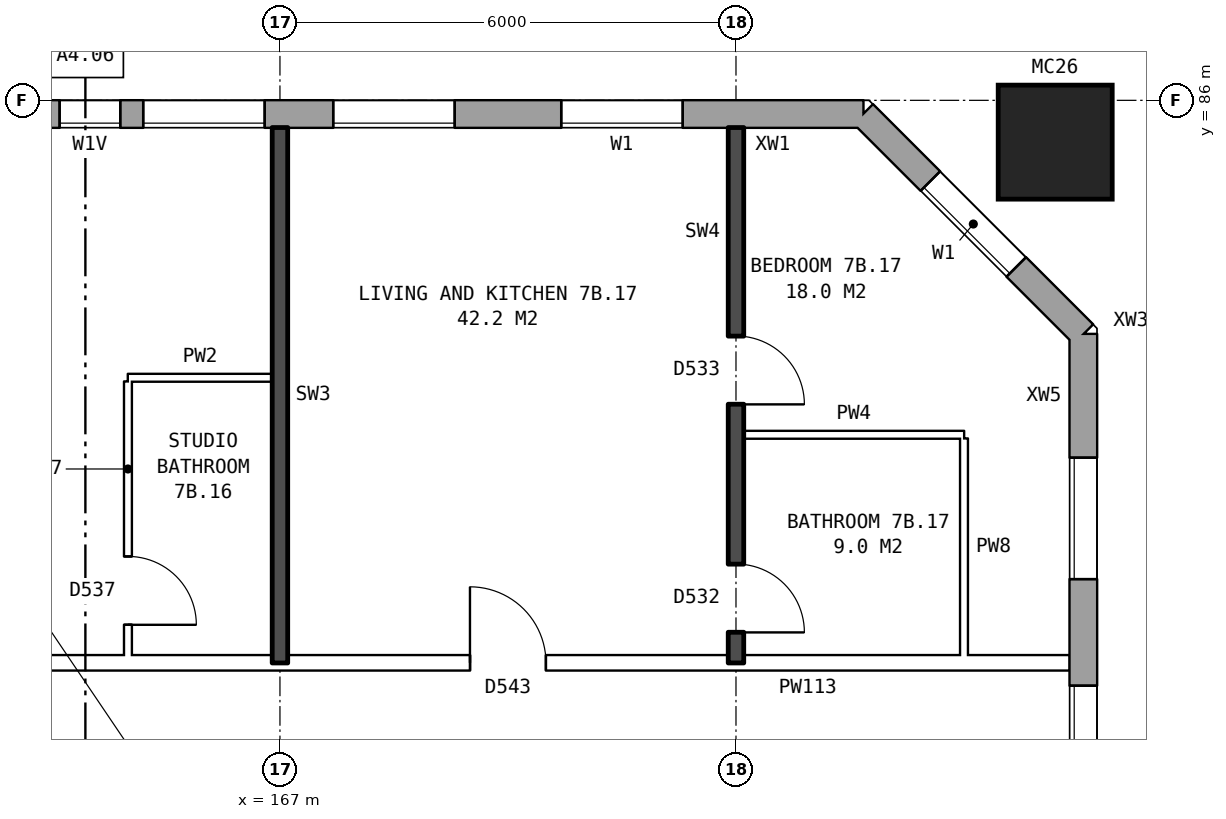
"""IFC4 building model, lengths in metres.
Left out: names, types, materials, properties, quantities, classifications, styles, units other than length and angle.
Written with IfcOpenShell. Run it as: python <this file> out.ifc"""

import sys

from ifc_helpers import new_model, si_unit, direction, frame, frame_2d, origin, origin_2d, place, context, subcontext, project, spatial, rectangle, hollow_rectangle, extrude, element, fill, save


model = new_model("IFC4")
c1 = context("Model", 3, precision=1e-05, world=origin(), true_north=direction((0.0, 1.0)))
c2 = subcontext(c1, "Body", "Model", "MODEL_VIEW")
j1 = project(units=[si_unit("LENGTHUNIT", "METRE"), si_unit("PLANEANGLEUNIT", "RADIAN")], contexts=[c1])
p1 = place(None, origin())
s1 = spatial("IfcSite", under=j1, at=p1, CompositionType="ELEMENT")
p2 = place(p1, origin())
s2 = spatial("IfcBuilding", under=s1, at=p2, CompositionType="ELEMENT")
p3 = place(p2, frame((0.0, 0.0, 28.8)))
s3 = spatial("IfcBuildingStorey", under=s2, at=p3, CompositionType="ELEMENT", Elevation=28.8)
p4 = place(p3, frame((177.2, 85.45, 0.0), z_axis=(0.0, 0.0, 1.0), x_axis=(1.0, 0.0, 0.0)))
e1 = element("IfcColumn", 1, at=p4, inside=s3, PredefinedType="COLUMN", context=c2, shape_type="SweptSolid", body=[
    extrude(hollow_rectangle(XDim=1.5, YDim=1.5, WallThickness=0.08, at=origin_2d()), origin(), (0.0, 0.0, 1.0), 3.1),
])
p5 = place(p3, frame((177.57, 57.075, 0.0), z_axis=(0.0, 0.0, 1.0), x_axis=(0.0, 1.0, 0.0)))
e2 = element("IfcWall", 2, at=p5, inside=s3, PredefinedType="STANDARD", context=c2, shape_type="SweptSolid", body=[
    extrude(rectangle(XDim=25.851, YDim=0.36, at=frame_2d((12.925, 0.0))), origin(), (0.0, 0.0, 1.0), 2.85),
])
p6 = place(p5, frame((1.625, 0.0, 0.8)))
e3 = element("IfcOpeningElement", 3, at=p6, cuts=e2, PredefinedType="OPENING", context=c2, shape_type="SweptSolid", body=[
    extrude(rectangle(XDim=1.6, YDim=1.8, at=frame_2d((0.8, 0.9))), frame((0.0, 0.19, 0.0), z_axis=(0.0, -1.0, 0.0), x_axis=(1.0, 0.0, 0.0)), (0.0, 0.0, 1.0), 0.38),
])
p7 = place(p5, frame((4.625, 0.0, 0.8)))
e4 = element("IfcOpeningElement", 4, at=p7, cuts=e2, PredefinedType="OPENING", context=c2, shape_type="SweptSolid", body=[
    extrude(rectangle(XDim=1.6, YDim=1.8, at=frame_2d((0.8, 0.9))), frame((0.0, 0.19, 0.0), z_axis=(0.0, -1.0, 0.0), x_axis=(1.0, 0.0, 0.0)), (0.0, 0.0, 1.0), 0.38),
])
p8 = place(p5, frame((6.525, 0.0, 0.8)))
e5 = element("IfcOpeningElement", 5, at=p8, cuts=e2, PredefinedType="OPENING", context=c2, shape_type="SweptSolid", body=[
    extrude(rectangle(XDim=1.0, YDim=1.8, at=frame_2d((0.5, 0.9))), frame((0.0, 0.19, 0.0), z_axis=(0.0, -1.0, 0.0), x_axis=(1.0, 0.0, 0.0)), (0.0, 0.0, 1.0), 0.38),
])
p9 = place(p5, frame((7.825, 0.0, 0.8)))
e6 = element("IfcOpeningElement", 6, at=p9, cuts=e2, PredefinedType="OPENING", context=c2, shape_type="SweptSolid", body=[
    extrude(rectangle(XDim=1.2, YDim=0.9, at=frame_2d((0.6, 0.45))), frame((0.0, 0.19, 0.0), z_axis=(0.0, -1.0, 0.0), x_axis=(1.0, 0.0, 0.0)), (0.0, 0.0, 1.0), 0.38),
])
p10 = place(p5, frame((10.325, 0.0, 1.7)))
e7 = element("IfcOpeningElement", 7, at=p10, cuts=e2, PredefinedType="OPENING", context=c2, shape_type="SweptSolid", body=[
    extrude(rectangle(XDim=1.2, YDim=0.9, at=frame_2d((0.6, 0.45))), frame((0.0, 0.19, 0.0), z_axis=(0.0, -1.0, 0.0), x_axis=(1.0, 0.0, 0.0)), (0.0, 0.0, 1.0), 0.38),
])
p11 = place(p5, frame((11.825, 0.0, 0.8)))
e8 = element("IfcOpeningElement", 8, at=p11, cuts=e2, PredefinedType="OPENING", context=c2, shape_type="SweptSolid", body=[
    extrude(rectangle(XDim=1.6, YDim=1.8, at=frame_2d((0.8, 0.9))), frame((0.0, 0.19, 0.0), z_axis=(0.0, -1.0, 0.0), x_axis=(1.0, 0.0, 0.0)), (0.0, 0.0, 1.0), 0.38),
])
p12 = place(p5, frame((19.625, 0.0, 0.8)))
e9 = element("IfcOpeningElement", 9, at=p12, cuts=e2, PredefinedType="OPENING", context=c2, shape_type="SweptSolid", body=[
    extrude(rectangle(XDim=1.6, YDim=1.8, at=frame_2d((0.8, 0.9))), frame((0.0, 0.19, 0.0), z_axis=(0.0, -1.0, 0.0), x_axis=(1.0, 0.0, 0.0)), (0.0, 0.0, 1.0), 0.38),
])
p13 = place(p5, frame((22.625, 0.0, 0.8)))
e10 = element("IfcOpeningElement", 10, at=p13, cuts=e2, PredefinedType="OPENING", context=c2, shape_type="SweptSolid", body=[
    extrude(rectangle(XDim=1.6, YDim=1.8, at=frame_2d((0.8, 0.9))), frame((0.0, 0.19, 0.0), z_axis=(0.0, -1.0, 0.0), x_axis=(1.0, 0.0, 0.0)), (0.0, 0.0, 1.0), 0.38),
])
p14 = place(p5, frame((13.725, 0.0, 1.1)))
e11 = element("IfcOpeningElement", 11, at=p14, cuts=e2, PredefinedType="OPENING", context=c2, shape_type="SweptSolid", body=[
    extrude(rectangle(XDim=0.8, YDim=1.5, at=frame_2d((0.4, 0.75))), frame((0.0, 0.19, 0.0), z_axis=(0.0, -1.0, 0.0), x_axis=(1.0, 0.0, 0.0)), (0.0, 0.0, 1.0), 0.38),
])
p15 = place(p5, frame((14.825, 0.0, 1.7)))
e12 = element("IfcOpeningElement", 12, at=p15, cuts=e2, PredefinedType="OPENING", context=c2, shape_type="SweptSolid", body=[
    extrude(rectangle(XDim=0.6, YDim=0.9, at=frame_2d((0.3, 0.45))), frame((0.0, 0.19, 0.0), z_axis=(0.0, -1.0, 0.0), x_axis=(1.0, 0.0, 0.0)), (0.0, 0.0, 1.0), 0.38),
])
p16 = place(p5, frame((16.775, 0.0, 0.8)))
e13 = element("IfcOpeningElement", 13, at=p16, cuts=e2, PredefinedType="OPENING", context=c2, shape_type="SweptSolid", body=[
    extrude(rectangle(XDim=1.2, YDim=0.9, at=frame_2d((0.6, 0.45))), frame((0.0, 0.19, 0.0), z_axis=(0.0, -1.0, 0.0), x_axis=(1.0, 0.0, 0.0)), (0.0, 0.0, 1.0), 0.38),
])
p17 = place(p5, frame((18.275, 0.0, 0.8)))
e14 = element("IfcOpeningElement", 14, at=p17, cuts=e2, PredefinedType="OPENING", context=c2, shape_type="SweptSolid", body=[
    extrude(rectangle(XDim=1.0, YDim=1.8, at=frame_2d((0.5, 0.9))), frame((0.0, 0.19, 0.0), z_axis=(0.0, -1.0, 0.0), x_axis=(1.0, 0.0, 0.0)), (0.0, 0.0, 1.0), 0.38),
])
p18 = place(p3, frame((177.57, 82.925, 0.0), z_axis=(0.0, 0.0, 1.0), x_axis=(-0.707106781187, 0.707106781187, 0.0)))
e15 = element("IfcWall", 15, at=p18, inside=s3, PredefinedType="STANDARD", context=c2, shape_type="SweptSolid", body=[
    extrude(rectangle(XDim=4.094, YDim=0.36, at=frame_2d((2.047, 0.0))), origin(), (0.0, 0.0, 1.0), 2.85),
])
p19 = place(p18, frame((1.247, 0.0, 0.8)))
e16 = element("IfcOpeningElement", 16, at=p19, cuts=e15, PredefinedType="OPENING", context=c2, shape_type="SweptSolid", body=[
    extrude(rectangle(XDim=1.6, YDim=1.8, at=frame_2d((0.8, 0.9))), frame((0.0, 0.19, 0.0), z_axis=(0.0, -1.0, 0.0), x_axis=(1.0, 0.0, 0.0)), (0.0, 0.0, 1.0), 0.38),
])
p20 = place(p3, frame((174.675, 85.82, 0.0), z_axis=(0.0, 0.0, 1.0), x_axis=(-1.0, 0.0, 0.0)))
e17 = element("IfcWall", 17, at=p20, inside=s3, PredefinedType="STANDARD", context=c2, shape_type="SweptSolid", body=[
    extrude(rectangle(XDim=40.601, YDim=0.36, at=frame_2d((20.3, 0.0))), origin(), (0.0, 0.0, 1.0), 2.85),
])
p21 = place(p20, frame((2.375, 0.0, 0.8)))
e18 = element("IfcOpeningElement", 18, at=p21, cuts=e17, PredefinedType="OPENING", context=c2, shape_type="SweptSolid", body=[
    extrude(rectangle(XDim=1.6, YDim=1.8, at=frame_2d((0.8, 0.9))), frame((0.0, 0.19, 0.0), z_axis=(0.0, -1.0, 0.0), x_axis=(1.0, 0.0, 0.0)), (0.0, 0.0, 1.0), 0.38),
])
p22 = place(p20, frame((5.375, 0.0, 0.8)))
e19 = element("IfcOpeningElement", 19, at=p22, cuts=e17, PredefinedType="OPENING", context=c2, shape_type="SweptSolid", body=[
    extrude(rectangle(XDim=1.6, YDim=1.8, at=frame_2d((0.8, 0.9))), frame((0.0, 0.19, 0.0), z_axis=(0.0, -1.0, 0.0), x_axis=(1.0, 0.0, 0.0)), (0.0, 0.0, 1.0), 0.38),
])
p23 = place(p20, frame((7.875, 0.0, 0.8)))
e20 = element("IfcOpeningElement", 20, at=p23, cuts=e17, PredefinedType="OPENING", context=c2, shape_type="SweptSolid", body=[
    extrude(rectangle(XDim=1.6, YDim=1.8, at=frame_2d((0.8, 0.9))), frame((0.0, 0.19, 0.0), z_axis=(0.0, -1.0, 0.0), x_axis=(1.0, 0.0, 0.0)), (0.0, 0.0, 1.0), 0.38),
])
p24 = place(p20, frame((9.775, 0.0, 1.7)))
e21 = element("IfcOpeningElement", 21, at=p24, cuts=e17, PredefinedType="OPENING", context=c2, shape_type="SweptSolid", body=[
    extrude(rectangle(XDim=0.8, YDim=0.9, at=frame_2d((0.4, 0.45))), frame((0.0, 0.19, 0.0), z_axis=(0.0, -1.0, 0.0), x_axis=(1.0, 0.0, 0.0)), (0.0, 0.0, 1.0), 0.38),
])
p25 = place(p20, frame((14.375, 0.0, 0.8)))
e22 = element("IfcOpeningElement", 22, at=p25, cuts=e17, PredefinedType="OPENING", context=c2, shape_type="SweptSolid", body=[
    extrude(rectangle(XDim=1.6, YDim=1.8, at=frame_2d((0.8, 0.9))), frame((0.0, 0.19, 0.0), z_axis=(0.0, -1.0, 0.0), x_axis=(1.0, 0.0, 0.0)), (0.0, 0.0, 1.0), 0.38),
])
p26 = place(p20, frame((17.375, 0.0, 0.8)))
e23 = element("IfcOpeningElement", 23, at=p26, cuts=e17, PredefinedType="OPENING", context=c2, shape_type="SweptSolid", body=[
    extrude(rectangle(XDim=1.6, YDim=1.8, at=frame_2d((0.8, 0.9))), frame((0.0, 0.19, 0.0), z_axis=(0.0, -1.0, 0.0), x_axis=(1.0, 0.0, 0.0)), (0.0, 0.0, 1.0), 0.38),
])
p27 = place(p20, frame((20.375, 0.0, 0.8)))
e24 = element("IfcOpeningElement", 24, at=p27, cuts=e17, PredefinedType="OPENING", context=c2, shape_type="SweptSolid", body=[
    extrude(rectangle(XDim=1.6, YDim=1.8, at=frame_2d((0.8, 0.9))), frame((0.0, 0.19, 0.0), z_axis=(0.0, -1.0, 0.0), x_axis=(1.0, 0.0, 0.0)), (0.0, 0.0, 1.0), 0.38),
])
p28 = place(p20, frame((23.375, 0.0, 0.8)))
e25 = element("IfcOpeningElement", 25, at=p28, cuts=e17, PredefinedType="OPENING", context=c2, shape_type="SweptSolid", body=[
    extrude(rectangle(XDim=1.6, YDim=1.8, at=frame_2d((0.8, 0.9))), frame((0.0, 0.19, 0.0), z_axis=(0.0, -1.0, 0.0), x_axis=(1.0, 0.0, 0.0)), (0.0, 0.0, 1.0), 0.38),
])
p29 = place(p20, frame((25.875, 0.0, 0.8)))
e26 = element("IfcOpeningElement", 26, at=p29, cuts=e17, PredefinedType="OPENING", context=c2, shape_type="SweptSolid", body=[
    extrude(rectangle(XDim=1.6, YDim=1.8, at=frame_2d((0.8, 0.9))), frame((0.0, 0.19, 0.0), z_axis=(0.0, -1.0, 0.0), x_axis=(1.0, 0.0, 0.0)), (0.0, 0.0, 1.0), 0.38),
])
p30 = place(p20, frame((28.825, 0.0, 0.15)))
e27 = element("IfcOpeningElement", 27, at=p30, cuts=e17, PredefinedType="OPENING", context=c2, shape_type="SweptSolid", body=[
    extrude(rectangle(XDim=0.6, YDim=0.9, at=frame_2d((0.3, 0.45))), frame((0.0, 0.19, 0.0), z_axis=(0.0, -1.0, 0.0), x_axis=(1.0, 0.0, 0.0)), (0.0, 0.0, 1.0), 0.38),
])
p31 = place(p20, frame((32.375, 0.0, 0.8)))
e28 = element("IfcOpeningElement", 28, at=p31, cuts=e17, PredefinedType="OPENING", context=c2, shape_type="SweptSolid", body=[
    extrude(rectangle(XDim=1.6, YDim=1.8, at=frame_2d((0.8, 0.9))), frame((0.0, 0.19, 0.0), z_axis=(0.0, -1.0, 0.0), x_axis=(1.0, 0.0, 0.0)), (0.0, 0.0, 1.0), 0.38),
])
p32 = place(p20, frame((35.375, 0.0, 0.8)))
e29 = element("IfcOpeningElement", 29, at=p32, cuts=e17, PredefinedType="OPENING", context=c2, shape_type="SweptSolid", body=[
    extrude(rectangle(XDim=1.6, YDim=1.8, at=frame_2d((0.8, 0.9))), frame((0.0, 0.19, 0.0), z_axis=(0.0, -1.0, 0.0), x_axis=(1.0, 0.0, 0.0)), (0.0, 0.0, 1.0), 0.38),
])
p33 = place(p20, frame((38.375, 0.0, 0.8)))
e30 = element("IfcOpeningElement", 30, at=p33, cuts=e17, PredefinedType="OPENING", context=c2, shape_type="SweptSolid", body=[
    extrude(rectangle(XDim=1.6, YDim=1.8, at=frame_2d((0.8, 0.9))), frame((0.0, 0.19, 0.0), z_axis=(0.0, -1.0, 0.0), x_axis=(1.0, 0.0, 0.0)), (0.0, 0.0, 1.0), 0.38),
])
p34 = place(p20, frame((12.275, 0.0, 0.8)))
e31 = element("IfcOpeningElement", 31, at=p34, cuts=e17, PredefinedType="OPENING", context=c2, shape_type="SweptSolid", body=[
    extrude(rectangle(XDim=1.2, YDim=1.2, at=frame_2d((0.6, 0.6))), frame((0.0, 0.19, 0.0), z_axis=(0.0, -1.0, 0.0), x_axis=(1.0, 0.0, 0.0)), (0.0, 0.0, 1.0), 0.38),
])
p35 = place(p20, frame((27.775, 0.0, 0.8)))
e32 = element("IfcOpeningElement", 32, at=p35, cuts=e17, PredefinedType="OPENING", context=c2, shape_type="SweptSolid", body=[
    extrude(rectangle(XDim=0.6, YDim=0.9, at=frame_2d((0.3, 0.45))), frame((0.0, 0.19, 0.0), z_axis=(0.0, -1.0, 0.0), x_axis=(1.0, 0.0, 0.0)), (0.0, 0.0, 1.0), 0.38),
])
p36 = place(p20, frame((30.025, 0.0, 1.65)))
e33 = element("IfcOpeningElement", 33, at=p36, cuts=e17, PredefinedType="OPENING", context=c2, shape_type="SweptSolid", body=[
    extrude(rectangle(XDim=1.4, YDim=0.9, at=frame_2d((0.7, 0.45))), frame((0.0, 0.19, 0.0), z_axis=(0.0, -1.0, 0.0), x_axis=(1.0, 0.0, 0.0)), (0.0, 0.0, 1.0), 0.38),
])
p37 = place(p3, frame((155.1, 78.6, 0.0), z_axis=(0.0, 0.0, 1.0), x_axis=(1.0, 0.0, 0.0)))
e34 = element("IfcWall", 34, at=p37, inside=s3, PredefinedType="PARTITIONING", context=c2, shape_type="SweptSolid", body=[
    extrude(rectangle(XDim=22.29, YDim=0.2, at=frame_2d((11.145, 0.0))), origin(), (0.0, 0.0, 1.0), 2.85),
])
p38 = place(p37, frame((1.45, 0.0, 0.0)))
e35 = element("IfcOpeningElement", 35, at=p38, cuts=e34, PredefinedType="OPENING", context=c2, shape_type="SweptSolid", body=[
    extrude(rectangle(XDim=1.0, YDim=2.1, at=frame_2d((0.5, 1.05))), frame((0.0, 0.11, 0.0), z_axis=(0.0, -1.0, 0.0), x_axis=(1.0, 0.0, 0.0)), (0.0, 0.0, 1.0), 0.22),
])
p39 = place(p37, frame((7.4, 0.0, 0.0)))
e36 = element("IfcOpeningElement", 36, at=p39, cuts=e34, PredefinedType="OPENING", context=c2, shape_type="SweptSolid", body=[
    extrude(rectangle(XDim=1.0, YDim=2.1, at=frame_2d((0.5, 1.05))), frame((0.0, 0.11, 0.0), z_axis=(0.0, -1.0, 0.0), x_axis=(1.0, 0.0, 0.0)), (0.0, 0.0, 1.0), 0.22),
])
p40 = place(p37, frame((14.4, 0.0, 0.0)))
e37 = element("IfcOpeningElement", 37, at=p40, cuts=e34, PredefinedType="OPENING", context=c2, shape_type="SweptSolid", body=[
    extrude(rectangle(XDim=1.0, YDim=2.1, at=frame_2d((0.5, 1.05))), frame((0.0, 0.11, 0.0), z_axis=(0.0, -1.0, 0.0), x_axis=(1.0, 0.0, 0.0)), (0.0, 0.0, 1.0), 0.22),
])
p41 = place(p3, frame((173.1, 81.6, 0.0), z_axis=(0.0, 0.0, 1.0), x_axis=(1.0, 0.0, 0.0)))
e38 = element("IfcWall", 38, at=p41, inside=s3, PredefinedType="PARTITIONING", context=c2, shape_type="SweptSolid", body=[
    extrude(rectangle(XDim=2.9, YDim=0.1, at=frame_2d((1.45, 0.0))), origin(), (0.0, 0.0, 1.0), 2.85),
])
p42 = place(p3, frame((165.0, 82.35, 0.0), z_axis=(0.0, 0.0, 1.0), x_axis=(1.0, 0.0, 0.0)))
e39 = element("IfcWall", 39, at=p42, inside=s3, PredefinedType="PARTITIONING", context=c2, shape_type="SweptSolid", body=[
    extrude(rectangle(XDim=1.9, YDim=0.1, at=frame_2d((0.95, 0.0))), origin(), (0.0, 0.0, 1.0), 2.85),
])
p43 = place(p3, frame((165.0, 78.7, 0.0), z_axis=(0.0, 0.0, 1.0), x_axis=(0.0, 1.0, 0.0)))
e40 = element("IfcWall", 40, at=p43, inside=s3, PredefinedType="PARTITIONING", context=c2, shape_type="SweptSolid", body=[
    extrude(rectangle(XDim=3.6, YDim=0.1, at=frame_2d((1.8, 0.0))), origin(), (0.0, 0.0, 1.0), 2.85),
])
p44 = place(p43, frame((0.4, 0.0, 0.0)))
e41 = element("IfcOpeningElement", 41, at=p44, cuts=e40, PredefinedType="OPENING", context=c2, shape_type="SweptSolid", body=[
    extrude(rectangle(XDim=0.9, YDim=2.1, at=frame_2d((0.45, 1.05))), frame((0.0, 0.06, 0.0), z_axis=(0.0, -1.0, 0.0), x_axis=(1.0, 0.0, 0.0)), (0.0, 0.0, 1.0), 0.12),
])
p45 = place(p3, frame((167.0, 78.6, 0.0), z_axis=(0.0, 0.0, 1.0), x_axis=(0.0, 1.0, 0.0)))
e42 = element("IfcWall", 42, at=p45, inside=s3, PredefinedType="SOLIDWALL", context=c2, shape_type="SweptSolid", body=[
    extrude(rectangle(XDim=7.04, YDim=0.2, at=frame_2d((3.52, 0.0))), origin(), (0.0, 0.0, 1.0), 2.85),
])
p46 = place(p3, frame((173.0, 78.6, 0.0), z_axis=(0.0, 0.0, 1.0), x_axis=(0.0, 1.0, 0.0)))
e43 = element("IfcWall", 43, at=p46, inside=s3, PredefinedType="SOLIDWALL", context=c2, shape_type="SweptSolid", body=[
    extrude(rectangle(XDim=7.04, YDim=0.2, at=frame_2d((3.52, 0.0))), origin(), (0.0, 0.0, 1.0), 2.85),
])
p47 = place(p46, frame((3.4, 0.0, 0.0)))
e44 = element("IfcOpeningElement", 44, at=p47, cuts=e43, PredefinedType="OPENING", context=c2, shape_type="SweptSolid", body=[
    extrude(rectangle(XDim=0.9, YDim=2.1, at=frame_2d((0.45, 1.05))), frame((0.0, 0.11, 0.0), z_axis=(0.0, -1.0, 0.0), x_axis=(1.0, 0.0, 0.0)), (0.0, 0.0, 1.0), 0.22),
])
p48 = place(p46, frame((0.4, 0.0, 0.0)))
e45 = element("IfcOpeningElement", 45, at=p48, cuts=e43, PredefinedType="OPENING", context=c2, shape_type="SweptSolid", body=[
    extrude(rectangle(XDim=0.9, YDim=2.1, at=frame_2d((0.45, 1.05))), frame((0.0, 0.11, 0.0), z_axis=(0.0, -1.0, 0.0), x_axis=(1.0, 0.0, 0.0)), (0.0, 0.0, 1.0), 0.22),
])
p49 = place(p3, frame((176.0, 78.7, 0.0), z_axis=(0.0, 0.0, 1.0), x_axis=(0.0, 1.0, 0.0)))
e46 = element("IfcWall", 46, at=p49, inside=s3, PredefinedType="PARTITIONING", context=c2, shape_type="SweptSolid", body=[
    extrude(rectangle(XDim=2.85, YDim=0.1, at=frame_2d((1.425, 0.0))), origin(), (0.0, 0.0, 1.0), 2.85),
])
p50 = place(p12, origin())
e47 = element("IfcWindow", 47, at=p50, inside=s3, PartitioningType="SINGLE_PANEL", PredefinedType="WINDOW", context=c2, shape_type="SweptSolid", body=[
    extrude(rectangle(XDim=1.6, YDim=1.8, at=frame_2d((0.8, 0.9))), frame((0.0, 0.15, 0.0), z_axis=(0.0, -1.0, 0.0), x_axis=(1.0, 0.0, 0.0)), (0.0, 0.0, 1.0), 0.06),
])
fill(e9, e47)
p51 = place(p13, origin())
e48 = element("IfcWindow", 48, at=p51, inside=s3, PartitioningType="SINGLE_PANEL", PredefinedType="WINDOW", context=c2, shape_type="SweptSolid", body=[
    extrude(rectangle(XDim=1.6, YDim=1.8, at=frame_2d((0.8, 0.9))), frame((0.0, 0.15, 0.0), z_axis=(0.0, -1.0, 0.0), x_axis=(1.0, 0.0, 0.0)), (0.0, 0.0, 1.0), 0.06),
])
fill(e10, e48)
p52 = place(p19, origin())
e49 = element("IfcWindow", 49, at=p52, inside=s3, PartitioningType="SINGLE_PANEL", PredefinedType="WINDOW", context=c2, shape_type="SweptSolid", body=[
    extrude(rectangle(XDim=1.6, YDim=1.8, at=frame_2d((0.8, 0.9))), frame((0.0, 0.15, 0.0), z_axis=(0.0, -1.0, 0.0), x_axis=(1.0, 0.0, 0.0)), (0.0, 0.0, 1.0), 0.06),
])
fill(e16, e49)
p53 = place(p21, origin())
e50 = element("IfcWindow", 50, at=p53, inside=s3, PartitioningType="SINGLE_PANEL", PredefinedType="WINDOW", context=c2, shape_type="SweptSolid", body=[
    extrude(rectangle(XDim=1.6, YDim=1.8, at=frame_2d((0.8, 0.9))), frame((0.0, 0.15, 0.0), z_axis=(0.0, -1.0, 0.0), x_axis=(1.0, 0.0, 0.0)), (0.0, 0.0, 1.0), 0.06),
])
fill(e18, e50)
p54 = place(p22, origin())
e51 = element("IfcWindow", 51, at=p54, inside=s3, PartitioningType="SINGLE_PANEL", PredefinedType="WINDOW", context=c2, shape_type="SweptSolid", body=[
    extrude(rectangle(XDim=1.6, YDim=1.8, at=frame_2d((0.8, 0.9))), frame((0.0, 0.15, 0.0), z_axis=(0.0, -1.0, 0.0), x_axis=(1.0, 0.0, 0.0)), (0.0, 0.0, 1.0), 0.06),
])
fill(e19, e51)
p55 = place(p23, origin())
e52 = element("IfcWindow", 52, at=p55, inside=s3, PartitioningType="SINGLE_PANEL", PredefinedType="WINDOW", context=c2, shape_type="SweptSolid", body=[
    extrude(rectangle(XDim=1.6, YDim=1.8, at=frame_2d((0.8, 0.9))), frame((0.0, 0.15, 0.0), z_axis=(0.0, -1.0, 0.0), x_axis=(1.0, 0.0, 0.0)), (0.0, 0.0, 1.0), 0.06),
])
fill(e20, e52)
p56 = place(p24, origin())
e53 = element("IfcWindow", 53, at=p56, inside=s3, PartitioningType="SINGLE_PANEL", PredefinedType="WINDOW", context=c2, shape_type="SweptSolid", body=[
    extrude(rectangle(XDim=0.8, YDim=0.9, at=frame_2d((0.4, 0.45))), frame((0.0, 0.15, 0.0), z_axis=(0.0, -1.0, 0.0), x_axis=(1.0, 0.0, 0.0)), (0.0, 0.0, 1.0), 0.06),
])
fill(e21, e53)
p57 = place(p44, frame((0.9, 0.0, 0.0), z_axis=(0.0, 0.0, 1.0), x_axis=(-1.0, 0.0, 0.0)))
e54 = element("IfcDoor", 54, at=p57, inside=s3, OperationType="SINGLE_SWING_RIGHT", PredefinedType="DOOR", context=c2, shape_type="SweptSolid", body=[
    extrude(rectangle(XDim=0.9, YDim=2.1, at=frame_2d((0.45, 1.05))), frame((0.0, 0.025, 0.0), z_axis=(0.0, -1.0, 0.0), x_axis=(1.0, 0.0, 0.0)), (0.0, 0.0, 1.0), 0.05),
])
fill(e41, e54)
p58 = place(p47, frame((0.9, 0.0, 0.0), z_axis=(0.0, 0.0, 1.0), x_axis=(-1.0, 0.0, 0.0)))
e55 = element("IfcDoor", 55, at=p58, inside=s3, OperationType="SINGLE_SWING_RIGHT", PredefinedType="DOOR", context=c2, shape_type="SweptSolid", body=[
    extrude(rectangle(XDim=0.9, YDim=2.1, at=frame_2d((0.45, 1.05))), frame((0.0, 0.025, 0.0), z_axis=(0.0, -1.0, 0.0), x_axis=(1.0, 0.0, 0.0)), (0.0, 0.0, 1.0), 0.05),
])
fill(e44, e55)
p59 = place(p40, origin())
e56 = element("IfcDoor", 56, at=p59, inside=s3, OperationType="SINGLE_SWING_LEFT", PredefinedType="DOOR", context=c2, shape_type="SweptSolid", body=[
    extrude(rectangle(XDim=1.0, YDim=2.1, at=frame_2d((0.5, 1.05))), frame((0.0, 0.025, 0.0), z_axis=(0.0, -1.0, 0.0), x_axis=(1.0, 0.0, 0.0)), (0.0, 0.0, 1.0), 0.05),
])
fill(e37, e56)
p60 = place(p48, frame((0.9, 0.0, 0.0), z_axis=(0.0, 0.0, 1.0), x_axis=(-1.0, 0.0, 0.0)))
e57 = element("IfcDoor", 57, at=p60, inside=s3, OperationType="SINGLE_SWING_RIGHT", PredefinedType="DOOR", context=c2, shape_type="SweptSolid", body=[
    extrude(rectangle(XDim=0.9, YDim=2.1, at=frame_2d((0.45, 1.05))), frame((0.0, 0.025, 0.0), z_axis=(0.0, -1.0, 0.0), x_axis=(1.0, 0.0, 0.0)), (0.0, 0.0, 1.0), 0.05),
])
fill(e45, e57)
save(model, sys.argv[1])
